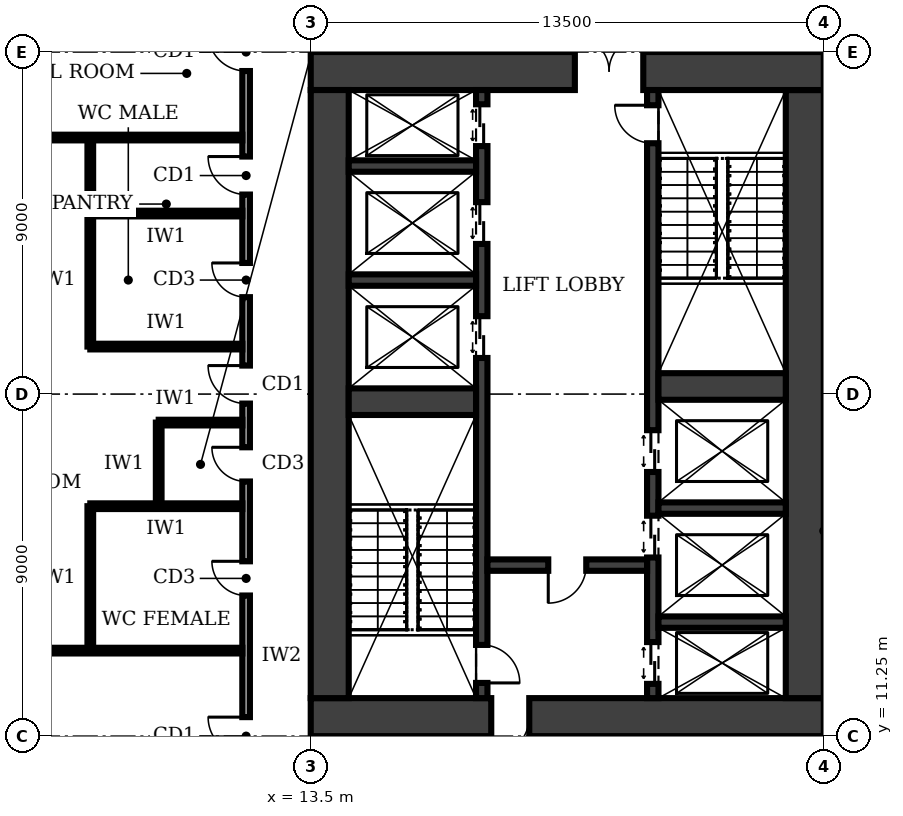
"""IFC4 building model, lengths in metres.
Left out: names, types, materials, properties, quantities, classifications, styles, units other than length and angle.
Written with IfcOpenShell. Run it as: python <this file> out.ifc"""

import sys

from ifc_helpers import new_model, si_unit, direction, frame, frame_2d, origin, place, context, subcontext, project, spatial, rectangle, extrude, element, fill, save


model = new_model("IFC4")
c1 = context("Model", 3, precision=1e-05, world=origin(), true_north=direction((0.0, 1.0)))
c2 = subcontext(c1, "Body", "Model", "MODEL_VIEW")
j1 = project(units=[si_unit("LENGTHUNIT", "METRE"), si_unit("PLANEANGLEUNIT", "RADIAN")], contexts=[c1])
p1 = place(None, origin())
s1 = spatial("IfcSite", under=j1, at=p1, CompositionType="ELEMENT")
p2 = place(p1, origin())
s2 = spatial("IfcBuilding", under=s1, at=p2, CompositionType="ELEMENT")
p3 = place(p2, origin())
s3 = spatial("IfcBuildingStorey", under=s2, at=p3, CompositionType="ELEMENT", Elevation=0.0)
p4 = place(p3, frame((13.5, 11.75, -0.4), z_axis=(0.0, 0.0, 1.0), x_axis=(1.0, 0.0, 0.0)))
e1 = element("IfcWall", 1, at=p4, inside=s3, PredefinedType="SHEAR", context=c2, shape_type="SweptSolid", body=[
    extrude(rectangle(XDim=13.5, YDim=1.0, at=frame_2d((6.75, 0.0))), origin(), (0.0, 0.0, 1.0), 6.4),
])
p5 = place(p4, frame((4.75, 0.0, 0.4)))
e2 = element("IfcOpeningElement", 2, at=p5, cuts=e1, PredefinedType="OPENING", context=c2, shape_type="SweptSolid", body=[
    extrude(rectangle(XDim=1.0, YDim=2.1, at=frame_2d((0.5, 1.05))), frame((0.0, 0.51, 0.0), z_axis=(0.0, -1.0, 0.0), x_axis=(1.0, 0.0, 0.0)), (0.0, 0.0, 1.0), 1.02),
])
p6 = place(p3, frame((26.5, 12.25, -0.4), z_axis=(0.0, 0.0, 1.0), x_axis=(0.0, 1.0, 0.0)))
e3 = element("IfcWall", 3, at=p6, inside=s3, PredefinedType="SHEAR", context=c2, shape_type="SweptSolid", body=[
    extrude(rectangle(XDim=16.0, YDim=1.0, at=frame_2d((8.0, 0.0))), origin(), (0.0, 0.0, 1.0), 6.4),
])
p7 = place(p3, frame((27.0, 28.75, -0.4), z_axis=(0.0, 0.0, 1.0), x_axis=(-1.0, 0.0, 0.0)))
e4 = element("IfcWall", 4, at=p7, inside=s3, PredefinedType="SHEAR", context=c2, shape_type="SweptSolid", body=[
    extrude(rectangle(XDim=13.5, YDim=1.0, at=frame_2d((6.75, 0.0))), origin(), (0.0, 0.0, 1.0), 6.4),
])
p8 = place(p7, frame((4.75, 0.0, 0.4)))
e5 = element("IfcOpeningElement", 5, at=p8, cuts=e4, PredefinedType="OPENING", context=c2, shape_type="SweptSolid", body=[
    extrude(rectangle(XDim=1.8, YDim=2.1, at=frame_2d((0.9, 1.05))), frame((0.0, 0.51, 0.0), z_axis=(0.0, -1.0, 0.0), x_axis=(1.0, 0.0, 0.0)), (0.0, 0.0, 1.0), 1.02),
])
p9 = place(p3, frame((14.0, 28.25, -0.4), z_axis=(0.0, 0.0, 1.0), x_axis=(0.0, -1.0, 0.0)))
e6 = element("IfcWall", 6, at=p9, inside=s3, PredefinedType="SHEAR", context=c2, shape_type="SweptSolid", body=[
    extrude(rectangle(XDim=16.0, YDim=1.0, at=frame_2d((8.0, 0.0))), origin(), (0.0, 0.0, 1.0), 6.4),
])
p10 = place(p3, frame((18.0, 12.25, -0.4), z_axis=(0.0, 0.0, 1.0), x_axis=(0.0, 1.0, 0.0)))
e7 = element("IfcWall", 7, at=p10, inside=s3, PredefinedType="SHEAR", context=c2, shape_type="SweptSolid", body=[
    extrude(rectangle(XDim=16.0, YDim=0.3, at=frame_2d((8.0, 0.0))), origin(), (0.0, 0.0, 1.0), 6.4),
])
p11 = place(p10, frame((0.4, 0.0, 0.4)))
e8 = element("IfcOpeningElement", 8, at=p11, cuts=e7, PredefinedType="OPENING", context=c2, shape_type="SweptSolid", body=[
    extrude(rectangle(XDim=1.0, YDim=2.1, at=frame_2d((0.5, 1.05))), frame((0.0, 0.16, 0.0), z_axis=(0.0, -1.0, 0.0), x_axis=(1.0, 0.0, 0.0)), (0.0, 0.0, 1.0), 0.32),
])
p12 = place(p10, frame((8.95, 0.0, 0.4)))
e9 = element("IfcOpeningElement", 9, at=p12, cuts=e7, PredefinedType="OPENING", context=c2, shape_type="SweptSolid", body=[
    extrude(rectangle(XDim=1.1, YDim=2.1, at=frame_2d((0.55, 1.05))), frame((0.0, 0.16, 0.0), z_axis=(0.0, -1.0, 0.0), x_axis=(1.0, 0.0, 0.0)), (0.0, 0.0, 1.0), 0.32),
])
p13 = place(p10, frame((11.95, 0.0, 0.4)))
e10 = element("IfcOpeningElement", 10, at=p13, cuts=e7, PredefinedType="OPENING", context=c2, shape_type="SweptSolid", body=[
    extrude(rectangle(XDim=1.1, YDim=2.1, at=frame_2d((0.55, 1.05))), frame((0.0, 0.16, 0.0), z_axis=(0.0, -1.0, 0.0), x_axis=(1.0, 0.0, 0.0)), (0.0, 0.0, 1.0), 0.32),
])
p14 = place(p10, frame((14.525, 0.0, 0.4)))
e11 = element("IfcOpeningElement", 11, at=p14, cuts=e7, PredefinedType="OPENING", context=c2, shape_type="SweptSolid", body=[
    extrude(rectangle(XDim=1.1, YDim=2.1, at=frame_2d((0.55, 1.05))), frame((0.0, 0.16, 0.0), z_axis=(0.0, -1.0, 0.0), x_axis=(1.0, 0.0, 0.0)), (0.0, 0.0, 1.0), 0.32),
])
p15 = place(p3, frame((22.5, 12.25, -0.4), z_axis=(0.0, 0.0, 1.0), x_axis=(0.0, 1.0, 0.0)))
e12 = element("IfcWall", 12, at=p15, inside=s3, PredefinedType="SHEAR", context=c2, shape_type="SweptSolid", body=[
    extrude(rectangle(XDim=16.0, YDim=0.3, at=frame_2d((8.0, 0.0))), origin(), (0.0, 0.0, 1.0), 6.4),
])
p16 = place(p15, frame((14.6, 0.0, 0.4)))
e13 = element("IfcOpeningElement", 13, at=p16, cuts=e12, PredefinedType="OPENING", context=c2, shape_type="SweptSolid", body=[
    extrude(rectangle(XDim=1.0, YDim=2.1, at=frame_2d((0.5, 1.05))), frame((0.0, 0.16, 0.0), z_axis=(0.0, -1.0, 0.0), x_axis=(1.0, 0.0, 0.0)), (0.0, 0.0, 1.0), 0.32),
])
p17 = place(p15, frame((0.375, 0.0, 0.4)))
e14 = element("IfcOpeningElement", 14, at=p17, cuts=e12, PredefinedType="OPENING", context=c2, shape_type="SweptSolid", body=[
    extrude(rectangle(XDim=1.1, YDim=2.1, at=frame_2d((0.55, 1.05))), frame((0.0, 0.16, 0.0), z_axis=(0.0, -1.0, 0.0), x_axis=(1.0, 0.0, 0.0)), (0.0, 0.0, 1.0), 0.32),
])
p18 = place(p15, frame((3.7, 0.0, 0.4)))
e15 = element("IfcOpeningElement", 15, at=p18, cuts=e12, PredefinedType="OPENING", context=c2, shape_type="SweptSolid", body=[
    extrude(rectangle(XDim=1.1, YDim=2.1, at=frame_2d((0.55, 1.05))), frame((0.0, 0.16, 0.0), z_axis=(0.0, -1.0, 0.0), x_axis=(1.0, 0.0, 0.0)), (0.0, 0.0, 1.0), 0.32),
])
p19 = place(p15, frame((5.95, 0.0, 0.4)))
e16 = element("IfcOpeningElement", 16, at=p19, cuts=e12, PredefinedType="OPENING", context=c2, shape_type="SweptSolid", body=[
    extrude(rectangle(XDim=1.1, YDim=2.1, at=frame_2d((0.55, 1.05))), frame((0.0, 0.16, 0.0), z_axis=(0.0, -1.0, 0.0), x_axis=(1.0, 0.0, 0.0)), (0.0, 0.0, 1.0), 0.32),
])
p20 = place(p3, frame((14.5, 20.05, -0.4), z_axis=(0.0, 0.0, 1.0), x_axis=(1.0, 0.0, 0.0)))
e17 = element("IfcWall", 17, at=p20, inside=s3, PredefinedType="SHEAR", context=c2, shape_type="SweptSolid", body=[
    extrude(rectangle(XDim=3.35, YDim=0.7, at=frame_2d((1.675, 0.0))), origin(), (0.0, 0.0, 1.0), 6.4),
])
p21 = place(p3, frame((18.15, 15.75, -0.4), z_axis=(0.0, 0.0, 1.0), x_axis=(1.0, 0.0, 0.0)))
e18 = element("IfcWall", 18, at=p21, inside=s3, PredefinedType="SHEAR", context=c2, shape_type="SweptSolid", body=[
    extrude(rectangle(XDim=4.2, YDim=0.3, at=frame_2d((2.1, 0.0))), origin(), (0.0, 0.0, 1.0), 6.4),
])
p22 = place(p21, frame((1.6, 0.0, 0.4)))
e19 = element("IfcOpeningElement", 19, at=p22, cuts=e18, PredefinedType="OPENING", context=c2, shape_type="SweptSolid", body=[
    extrude(rectangle(XDim=1.0, YDim=2.1, at=frame_2d((0.5, 1.05))), frame((0.0, 0.16, 0.0), z_axis=(0.0, -1.0, 0.0), x_axis=(1.0, 0.0, 0.0)), (0.0, 0.0, 1.0), 0.32),
])
for number, where, z_axis, x_axis in (
    (20, (22.65, 14.25, -0.4), (0.0, 0.0, 1.0), (1.0, 0.0, 0.0)),
    (21, (22.65, 17.25, -0.4), (0.0, 0.0, 1.0), (1.0, 0.0, 0.0)),
):
    element("IfcWall", number, at=place(p3, frame(where, z_axis=z_axis, x_axis=x_axis)), inside=s3, PredefinedType="SHEAR", context=c2, shape_type="SweptSolid", body=[
        extrude(rectangle(XDim=3.35, YDim=0.3, at=frame_2d((1.675, 0.0))), origin(), (0.0, 0.0, 1.0), 6.4),
    ])
p23 = place(p3, frame((22.65, 20.45, -0.4), z_axis=(0.0, 0.0, 1.0), x_axis=(1.0, 0.0, 0.0)))
e22 = element("IfcWall", 22, at=p23, inside=s3, PredefinedType="SHEAR", context=c2, shape_type="SweptSolid", body=[
    extrude(rectangle(XDim=3.35, YDim=0.7, at=frame_2d((1.675, 0.0))), origin(), (0.0, 0.0, 1.0), 6.4),
])
for number, where, z_axis, x_axis in (
    (23, (14.5, 23.25, -0.4), (0.0, 0.0, 1.0), (1.0, 0.0, 0.0)),
    (24, (14.5, 26.25, -0.4), (0.0, 0.0, 1.0), (1.0, 0.0, 0.0)),
):
    element("IfcWall", number, at=place(p3, frame(where, z_axis=z_axis, x_axis=x_axis)), inside=s3, PredefinedType="SHEAR", context=c2, shape_type="SweptSolid", body=[
        extrude(rectangle(XDim=3.35, YDim=0.3, at=frame_2d((1.675, 0.0))), origin(), (0.0, 0.0, 1.0), 6.4),
    ])
p24 = place(p3, frame((11.8, 31.3, 0.0), z_axis=(0.0, 0.0, 1.0), x_axis=(0.0, -1.0, 0.0)))
e25 = element("IfcWall", 25, at=p24, inside=s3, PredefinedType="SOLIDWALL", context=c2, shape_type="SweptSolid", body=[
    extrude(rectangle(XDim=22.3, YDim=0.2, at=frame_2d((11.15, 0.0))), origin(), (0.0, 0.0, 1.0), 5.7),
])
p25 = place(p24, frame((19.55, 0.0, 0.0)))
e26 = element("IfcOpeningElement", 26, at=p25, cuts=e25, PredefinedType="OPENING", context=c2, shape_type="SweptSolid", body=[
    extrude(rectangle(XDim=1.0, YDim=2.1, at=frame_2d((0.5, 1.05))), frame((0.0, 0.11, 0.0), z_axis=(0.0, -1.0, 0.0), x_axis=(1.0, 0.0, 0.0)), (0.0, 0.0, 1.0), 0.22),
])
p26 = place(p24, frame((15.45, 0.0, 0.0)))
e27 = element("IfcOpeningElement", 27, at=p26, cuts=e25, PredefinedType="OPENING", context=c2, shape_type="SweptSolid", body=[
    extrude(rectangle(XDim=0.9, YDim=2.1, at=frame_2d((0.45, 1.05))), frame((0.0, 0.11, 0.0), z_axis=(0.0, -1.0, 0.0), x_axis=(1.0, 0.0, 0.0)), (0.0, 0.0, 1.0), 0.22),
])
p27 = place(p24, frame((12.45, 0.0, 0.0)))
e28 = element("IfcOpeningElement", 28, at=p27, cuts=e25, PredefinedType="OPENING", context=c2, shape_type="SweptSolid", body=[
    extrude(rectangle(XDim=0.9, YDim=2.1, at=frame_2d((0.45, 1.05))), frame((0.0, 0.11, 0.0), z_axis=(0.0, -1.0, 0.0), x_axis=(1.0, 0.0, 0.0)), (0.0, 0.0, 1.0), 0.22),
])
p28 = place(p24, frame((7.6, 0.0, 0.0)))
e29 = element("IfcOpeningElement", 29, at=p28, cuts=e25, PredefinedType="OPENING", context=c2, shape_type="SweptSolid", body=[
    extrude(rectangle(XDim=0.9, YDim=2.1, at=frame_2d((0.45, 1.05))), frame((0.0, 0.11, 0.0), z_axis=(0.0, -1.0, 0.0), x_axis=(1.0, 0.0, 0.0)), (0.0, 0.0, 1.0), 0.22),
])
p29 = place(p24, frame((4.8, 0.0, 0.0)))
e30 = element("IfcOpeningElement", 30, at=p29, cuts=e25, PredefinedType="OPENING", context=c2, shape_type="SweptSolid", body=[
    extrude(rectangle(XDim=1.0, YDim=2.1, at=frame_2d((0.5, 1.05))), frame((0.0, 0.11, 0.0), z_axis=(0.0, -1.0, 0.0), x_axis=(1.0, 0.0, 0.0)), (0.0, 0.0, 1.0), 0.22),
])
p30 = place(p24, frame((10.3, 0.0, 0.0)))
e31 = element("IfcOpeningElement", 31, at=p30, cuts=e25, PredefinedType="OPENING", context=c2, shape_type="SweptSolid", body=[
    extrude(rectangle(XDim=1.0, YDim=2.1, at=frame_2d((0.5, 1.05))), frame((0.0, 0.11, 0.0), z_axis=(0.0, -1.0, 0.0), x_axis=(1.0, 0.0, 0.0)), (0.0, 0.0, 1.0), 0.22),
])
p31 = place(p24, frame((1.55, 0.0, 0.0)))
e32 = element("IfcOpeningElement", 32, at=p31, cuts=e25, PredefinedType="OPENING", context=c2, shape_type="SweptSolid", body=[
    extrude(rectangle(XDim=1.0, YDim=2.1, at=frame_2d((0.5, 1.05))), frame((0.0, 0.11, 0.0), z_axis=(0.0, -1.0, 0.0), x_axis=(1.0, 0.0, 0.0)), (0.0, 0.0, 1.0), 0.22),
])
p32 = place(p3, frame((0.3, 13.5, 0.0), z_axis=(0.0, 0.0, 1.0), x_axis=(1.0, 0.0, 0.0)))
e33 = element("IfcWall", 33, at=p32, inside=s3, PredefinedType="PARTITIONING", context=c2, shape_type="SweptSolid", body=[
    extrude(rectangle(XDim=11.4, YDim=0.15, at=frame_2d((5.7, 0.0))), origin(), (0.0, 0.0, 1.0), 5.7),
])
p33 = place(p3, frame((0.18, 27.0, 0.0), z_axis=(0.0, 0.0, 1.0), x_axis=(1.0, 0.0, 0.0)))
e34 = element("IfcWall", 34, at=p33, inside=s3, PredefinedType="PARTITIONING", context=c2, shape_type="SweptSolid", body=[
    extrude(rectangle(XDim=11.52, YDim=0.15, at=frame_2d((5.76, 0.0))), origin(), (0.0, 0.0, 1.0), 5.7),
])
p34 = place(p3, frame((11.7, 17.3, 0.0), z_axis=(0.0, 0.0, 1.0), x_axis=(-1.0, 0.0, 0.0)))
e35 = element("IfcWall", 35, at=p34, inside=s3, PredefinedType="PARTITIONING", context=c2, shape_type="SweptSolid", body=[
    extrude(rectangle(XDim=4.0, YDim=0.15, at=frame_2d((2.0, 0.0))), origin(), (0.0, 0.0, 1.0), 5.7),
])
p35 = place(p3, frame((11.7, 19.5, 0.0), z_axis=(0.0, 0.0, 1.0), x_axis=(-1.0, 0.0, 0.0)))
e36 = element("IfcWall", 36, at=p35, inside=s3, PredefinedType="PARTITIONING", context=c2, shape_type="SweptSolid", body=[
    extrude(rectangle(XDim=2.2, YDim=0.15, at=frame_2d((1.1, 0.0))), origin(), (0.0, 0.0, 1.0), 5.7),
])
for number, where, z_axis, x_axis in (
    (37, (11.7, 21.5, 0.0), (0.0, 0.0, 1.0), (-1.0, 0.0, 0.0)),
    (38, (11.7, 25.0, 0.0), (0.0, 0.0, 1.0), (-1.0, 0.0, 0.0)),
):
    element("IfcWall", number, at=place(p3, frame(where, z_axis=z_axis, x_axis=x_axis)), inside=s3, PredefinedType="PARTITIONING", context=c2, shape_type="SweptSolid", body=[
        extrude(rectangle(XDim=4.0, YDim=0.15, at=frame_2d((2.0, 0.0))), origin(), (0.0, 0.0, 1.0), 5.7),
    ])
p36 = place(p3, frame((7.7, 13.5, 0.0), z_axis=(0.0, 0.0, 1.0), x_axis=(0.0, 1.0, 0.0)))
e39 = element("IfcWall", 39, at=p36, inside=s3, PredefinedType="PARTITIONING", context=c2, shape_type="SweptSolid", body=[
    extrude(rectangle(XDim=3.8, YDim=0.15, at=frame_2d((1.9, 0.0))), origin(), (0.0, 0.0, 1.0), 5.7),
])
p37 = place(p3, frame((9.5, 17.3, 0.0), z_axis=(0.0, 0.0, 1.0), x_axis=(0.0, 1.0, 0.0)))
e40 = element("IfcWall", 40, at=p37, inside=s3, PredefinedType="PARTITIONING", context=c2, shape_type="SweptSolid", body=[
    extrude(rectangle(XDim=2.2, YDim=0.15, at=frame_2d((1.1, 0.0))), origin(), (0.0, 0.0, 1.0), 5.7),
])
p38 = place(p3, frame((7.7, 21.5, 0.0), z_axis=(0.0, 0.0, 1.0), x_axis=(0.0, 1.0, 0.0)))
e41 = element("IfcWall", 41, at=p38, inside=s3, PredefinedType="PARTITIONING", context=c2, shape_type="SweptSolid", body=[
    extrude(rectangle(XDim=3.5, YDim=0.15, at=frame_2d((1.75, 0.0))), origin(), (0.0, 0.0, 1.0), 5.7),
])
p39 = place(p3, frame((7.7, 25.0, 0.0), z_axis=(0.0, 0.0, 1.0), x_axis=(0.0, 1.0, 0.0)))
e42 = element("IfcWall", 42, at=p39, inside=s3, PredefinedType="PARTITIONING", context=c2, shape_type="SweptSolid", body=[
    extrude(rectangle(XDim=2.0, YDim=0.15, at=frame_2d((1.0, 0.0))), origin(), (0.0, 0.0, 1.0), 5.7),
])
p40 = place(p5, frame((1.0, 0.0, 0.0), z_axis=(0.0, 0.0, 1.0), x_axis=(-1.0, 0.0, 0.0)))
e43 = element("IfcDoor", 43, at=p40, inside=s3, OperationType="SINGLE_SWING_RIGHT", PredefinedType="DOOR", context=c2, shape_type="SweptSolid", body=[
    extrude(rectangle(XDim=1.0, YDim=2.1, at=frame_2d((0.5, 1.05))), frame((0.0, 0.025, 0.0), z_axis=(0.0, -1.0, 0.0), x_axis=(1.0, 0.0, 0.0)), (0.0, 0.0, 1.0), 0.05),
])
fill(e2, e43)
p41 = place(p8, frame((1.8, 0.0, 0.0), z_axis=(0.0, 0.0, 1.0), x_axis=(-1.0, 0.0, 0.0)))
e44 = element("IfcDoor", 44, at=p41, inside=s3, OperationType="DOUBLE_DOOR_SINGLE_SWING", PredefinedType="DOOR", context=c2, shape_type="SweptSolid", body=[
    extrude(rectangle(XDim=1.8, YDim=2.1, at=frame_2d((0.9, 1.05))), frame((0.0, 0.025, 0.0), z_axis=(0.0, -1.0, 0.0), x_axis=(1.0, 0.0, 0.0)), (0.0, 0.0, 1.0), 0.05),
])
fill(e5, e44)
p42 = place(p22, frame((1.0, 0.0, 0.0), z_axis=(0.0, 0.0, 1.0), x_axis=(-1.0, 0.0, 0.0)))
e45 = element("IfcDoor", 45, at=p42, inside=s3, OperationType="SINGLE_SWING_RIGHT", PredefinedType="DOOR", context=c2, shape_type="SweptSolid", body=[
    extrude(rectangle(XDim=1.0, YDim=2.1, at=frame_2d((0.5, 1.05))), frame((0.0, 0.025, 0.0), z_axis=(0.0, -1.0, 0.0), x_axis=(1.0, 0.0, 0.0)), (0.0, 0.0, 1.0), 0.05),
])
fill(e19, e45)
p43 = place(p11, frame((1.0, 0.0, 0.0), z_axis=(0.0, 0.0, 1.0), x_axis=(-1.0, 0.0, 0.0)))
e46 = element("IfcDoor", 46, at=p43, inside=s3, OperationType="SINGLE_SWING_RIGHT", PredefinedType="DOOR", context=c2, shape_type="SweptSolid", body=[
    extrude(rectangle(XDim=1.0, YDim=2.1, at=frame_2d((0.5, 1.05))), frame((0.0, 0.025, 0.0), z_axis=(0.0, -1.0, 0.0), x_axis=(1.0, 0.0, 0.0)), (0.0, 0.0, 1.0), 0.05),
])
fill(e8, e46)
p44 = place(p16, origin())
e47 = element("IfcDoor", 47, at=p44, inside=s3, OperationType="SINGLE_SWING_RIGHT", PredefinedType="DOOR", context=c2, shape_type="SweptSolid", body=[
    extrude(rectangle(XDim=1.0, YDim=2.1, at=frame_2d((0.5, 1.05))), frame((0.0, 0.025, 0.0), z_axis=(0.0, -1.0, 0.0), x_axis=(1.0, 0.0, 0.0)), (0.0, 0.0, 1.0), 0.05),
])
fill(e13, e47)
p45 = place(p17, origin())
e48 = element("IfcDoor", 48, at=p45, inside=s3, OperationType="DOUBLE_DOOR_SLIDING", PredefinedType="DOOR", context=c2, shape_type="SweptSolid", body=[
    extrude(rectangle(XDim=1.1, YDim=2.1, at=frame_2d((0.55, 1.05))), frame((0.0, 0.025, 0.0), z_axis=(0.0, -1.0, 0.0), x_axis=(1.0, 0.0, 0.0)), (0.0, 0.0, 1.0), 0.05),
])
fill(e14, e48)
p46 = place(p12, origin())
e49 = element("IfcDoor", 49, at=p46, inside=s3, OperationType="DOUBLE_DOOR_SLIDING", PredefinedType="DOOR", context=c2, shape_type="SweptSolid", body=[
    extrude(rectangle(XDim=1.1, YDim=2.1, at=frame_2d((0.55, 1.05))), frame((0.0, 0.025, 0.0), z_axis=(0.0, -1.0, 0.0), x_axis=(1.0, 0.0, 0.0)), (0.0, 0.0, 1.0), 0.05),
])
fill(e9, e49)
p47 = place(p13, origin())
e50 = element("IfcDoor", 50, at=p47, inside=s3, OperationType="DOUBLE_DOOR_SLIDING", PredefinedType="DOOR", context=c2, shape_type="SweptSolid", body=[
    extrude(rectangle(XDim=1.1, YDim=2.1, at=frame_2d((0.55, 1.05))), frame((0.0, 0.025, 0.0), z_axis=(0.0, -1.0, 0.0), x_axis=(1.0, 0.0, 0.0)), (0.0, 0.0, 1.0), 0.05),
])
fill(e10, e50)
p48 = place(p14, origin())
e51 = element("IfcDoor", 51, at=p48, inside=s3, OperationType="DOUBLE_DOOR_SLIDING", PredefinedType="DOOR", context=c2, shape_type="SweptSolid", body=[
    extrude(rectangle(XDim=1.1, YDim=2.1, at=frame_2d((0.55, 1.05))), frame((0.0, 0.025, 0.0), z_axis=(0.0, -1.0, 0.0), x_axis=(1.0, 0.0, 0.0)), (0.0, 0.0, 1.0), 0.05),
])
fill(e11, e51)
p49 = place(p18, origin())
e52 = element("IfcDoor", 52, at=p49, inside=s3, OperationType="DOUBLE_DOOR_SLIDING", PredefinedType="DOOR", context=c2, shape_type="SweptSolid", body=[
    extrude(rectangle(XDim=1.1, YDim=2.1, at=frame_2d((0.55, 1.05))), frame((0.0, 0.025, 0.0), z_axis=(0.0, -1.0, 0.0), x_axis=(1.0, 0.0, 0.0)), (0.0, 0.0, 1.0), 0.05),
])
fill(e15, e52)
p50 = place(p19, origin())
e53 = element("IfcDoor", 53, at=p50, inside=s3, OperationType="DOUBLE_DOOR_SLIDING", PredefinedType="DOOR", context=c2, shape_type="SweptSolid", body=[
    extrude(rectangle(XDim=1.1, YDim=2.1, at=frame_2d((0.55, 1.05))), frame((0.0, 0.025, 0.0), z_axis=(0.0, -1.0, 0.0), x_axis=(1.0, 0.0, 0.0)), (0.0, 0.0, 1.0), 0.05),
])
fill(e16, e53)
p51 = place(p25, frame((1.0, 0.0, 0.0), z_axis=(0.0, 0.0, 1.0), x_axis=(-1.0, 0.0, 0.0)))
e54 = element("IfcDoor", 54, at=p51, inside=s3, OperationType="SINGLE_SWING_RIGHT", PredefinedType="DOOR", context=c2, shape_type="SweptSolid", body=[
    extrude(rectangle(XDim=1.0, YDim=2.1, at=frame_2d((0.5, 1.05))), frame((0.0, 0.025, 0.0), z_axis=(0.0, -1.0, 0.0), x_axis=(1.0, 0.0, 0.0)), (0.0, 0.0, 1.0), 0.05),
])
fill(e26, e54)
p52 = place(p26, frame((0.9, 0.0, 0.0), z_axis=(0.0, 0.0, 1.0), x_axis=(-1.0, 0.0, 0.0)))
e55 = element("IfcDoor", 55, at=p52, inside=s3, OperationType="SINGLE_SWING_RIGHT", PredefinedType="DOOR", context=c2, shape_type="SweptSolid", body=[
    extrude(rectangle(XDim=0.9, YDim=2.1, at=frame_2d((0.45, 1.05))), frame((0.0, 0.025, 0.0), z_axis=(0.0, -1.0, 0.0), x_axis=(1.0, 0.0, 0.0)), (0.0, 0.0, 1.0), 0.05),
])
fill(e27, e55)
p53 = place(p27, frame((0.9, 0.0, 0.0), z_axis=(0.0, 0.0, 1.0), x_axis=(-1.0, 0.0, 0.0)))
e56 = element("IfcDoor", 56, at=p53, inside=s3, OperationType="SINGLE_SWING_RIGHT", PredefinedType="DOOR", context=c2, shape_type="SweptSolid", body=[
    extrude(rectangle(XDim=0.9, YDim=2.1, at=frame_2d((0.45, 1.05))), frame((0.0, 0.025, 0.0), z_axis=(0.0, -1.0, 0.0), x_axis=(1.0, 0.0, 0.0)), (0.0, 0.0, 1.0), 0.05),
])
fill(e28, e56)
p54 = place(p28, frame((0.9, 0.0, 0.0), z_axis=(0.0, 0.0, 1.0), x_axis=(-1.0, 0.0, 0.0)))
e57 = element("IfcDoor", 57, at=p54, inside=s3, OperationType="SINGLE_SWING_RIGHT", PredefinedType="DOOR", context=c2, shape_type="SweptSolid", body=[
    extrude(rectangle(XDim=0.9, YDim=2.1, at=frame_2d((0.45, 1.05))), frame((0.0, 0.025, 0.0), z_axis=(0.0, -1.0, 0.0), x_axis=(1.0, 0.0, 0.0)), (0.0, 0.0, 1.0), 0.05),
])
fill(e29, e57)
p55 = place(p29, frame((1.0, 0.0, 0.0), z_axis=(0.0, 0.0, 1.0), x_axis=(-1.0, 0.0, 0.0)))
e58 = element("IfcDoor", 58, at=p55, inside=s3, OperationType="SINGLE_SWING_RIGHT", PredefinedType="DOOR", context=c2, shape_type="SweptSolid", body=[
    extrude(rectangle(XDim=1.0, YDim=2.1, at=frame_2d((0.5, 1.05))), frame((0.0, 0.025, 0.0), z_axis=(0.0, -1.0, 0.0), x_axis=(1.0, 0.0, 0.0)), (0.0, 0.0, 1.0), 0.05),
])
fill(e30, e58)
p56 = place(p30, frame((1.0, 0.0, 0.0), z_axis=(0.0, 0.0, 1.0), x_axis=(-1.0, 0.0, 0.0)))
e59 = element("IfcDoor", 59, at=p56, inside=s3, OperationType="SINGLE_SWING_RIGHT", PredefinedType="DOOR", context=c2, shape_type="SweptSolid", body=[
    extrude(rectangle(XDim=1.0, YDim=2.1, at=frame_2d((0.5, 1.05))), frame((0.0, 0.025, 0.0), z_axis=(0.0, -1.0, 0.0), x_axis=(1.0, 0.0, 0.0)), (0.0, 0.0, 1.0), 0.05),
])
fill(e31, e59)
p57 = place(p31, frame((1.0, 0.0, 0.0), z_axis=(0.0, 0.0, 1.0), x_axis=(-1.0, 0.0, 0.0)))
e60 = element("IfcDoor", 60, at=p57, inside=s3, OperationType="SINGLE_SWING_RIGHT", PredefinedType="DOOR", context=c2, shape_type="SweptSolid", body=[
    extrude(rectangle(XDim=1.0, YDim=2.1, at=frame_2d((0.5, 1.05))), frame((0.0, 0.025, 0.0), z_axis=(0.0, -1.0, 0.0), x_axis=(1.0, 0.0, 0.0)), (0.0, 0.0, 1.0), 0.05),
])
fill(e32, e60)
save(model, sys.argv[1])
